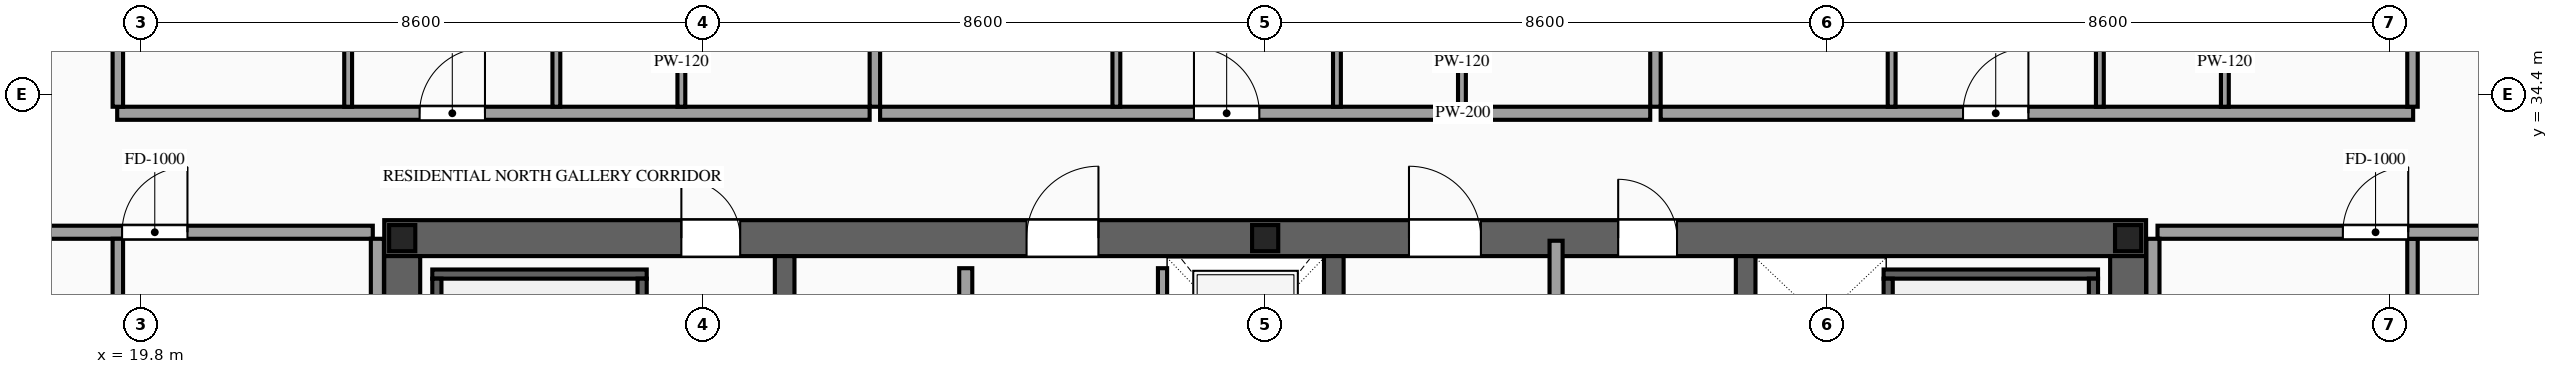
"""IFC4 building model, lengths in metres.
Left out: names, types, materials, properties, quantities, classifications, styles, units other than length and angle.
Written with IfcOpenShell. Run it as: python <this file> out.ifc"""

import sys

from ifc_helpers import new_model, si_unit, direction, frame, frame_2d, origin, origin_2d, place, context, subcontext, project, spatial, rectangle, i_section, extrude, source, transform, mapped, element, fill, save


model = new_model("IFC4")
c1 = context("Model", 3, precision=1e-05, world=origin(), true_north=direction((0.0, 1.0)))
c2 = subcontext(c1, "Body", "Model", "MODEL_VIEW")
j1 = project(units=[si_unit("LENGTHUNIT", "METRE"), si_unit("PLANEANGLEUNIT", "RADIAN")], contexts=[c1])
p1 = place(None, origin())
s1 = spatial("IfcSite", under=j1, at=p1, CompositionType="ELEMENT")
p2 = place(p1, origin())
s2 = spatial("IfcBuilding", under=s1, at=p2, CompositionType="ELEMENT")
p3 = place(p2, frame((0.0, 0.0, 255.6)))
s3 = spatial("IfcBuildingStorey", under=s2, at=p3, CompositionType="ELEMENT", Elevation=255.6)
p4 = place(p3, frame((23.525, 32.2, 0.0), z_axis=(0.0, 0.0, 1.0), x_axis=(1.0, 0.0, 0.0)))
e1 = element("IfcWall", 1, at=p4, inside=s3, PredefinedType="SHEAR", context=c2, shape_type="SweptSolid", body=[
    extrude(rectangle(XDim=26.95, YDim=0.55, at=frame_2d((13.475, 0.0))), origin(), (0.0, 0.0, 1.0), 3.5),
])
p5 = place(p4, frame((4.545, 0.0, 0.0)))
e2 = element("IfcOpeningElement", 2, at=p5, cuts=e1, PredefinedType="OPENING", context=c2, shape_type="SweptSolid", body=[
    extrude(rectangle(XDim=0.9, YDim=2.15, at=frame_2d((0.45, 1.075))), frame((0.0, 0.29, 0.0), z_axis=(0.0, -1.0, 0.0), x_axis=(1.0, 0.0, 0.0)), (0.0, 0.0, 1.0), 0.58),
])
p6 = place(p4, frame((9.825, 0.0, 0.0)))
e3 = element("IfcOpeningElement", 3, at=p6, cuts=e1, PredefinedType="OPENING", context=c2, shape_type="SweptSolid", body=[
    extrude(rectangle(XDim=1.1, YDim=2.2, at=frame_2d((0.55, 1.1))), frame((0.0, 0.29, 0.0), z_axis=(0.0, -1.0, 0.0), x_axis=(1.0, 0.0, 0.0)), (0.0, 0.0, 1.0), 0.58),
])
p7 = place(p4, frame((15.675, 0.0, 0.0)))
e4 = element("IfcOpeningElement", 4, at=p7, cuts=e1, PredefinedType="OPENING", context=c2, shape_type="SweptSolid", body=[
    extrude(rectangle(XDim=1.1, YDim=2.2, at=frame_2d((0.55, 1.1))), frame((0.0, 0.29, 0.0), z_axis=(0.0, -1.0, 0.0), x_axis=(1.0, 0.0, 0.0)), (0.0, 0.0, 1.0), 0.58),
])
p8 = place(p4, frame((18.875, 0.0, 0.0)))
e5 = element("IfcOpeningElement", 5, at=p8, cuts=e1, PredefinedType="OPENING", context=c2, shape_type="SweptSolid", body=[
    extrude(rectangle(XDim=0.9, YDim=2.15, at=frame_2d((0.45, 1.075))), frame((0.0, 0.29, 0.0), z_axis=(0.0, -1.0, 0.0), x_axis=(1.0, 0.0, 0.0)), (0.0, 0.0, 1.0), 0.58),
])
m1 = source(origin(), c2, "Body", "SweptSolid", [
    extrude(rectangle(XDim=12.25, YDim=0.55, at=frame_2d((6.125, 0.0))), origin(), (0.0, 0.0, 1.0), 3.5),
])
for number, where, z_axis, x_axis in (
    (6, (23.8, 19.675, 0.0), (0.0, 0.0, 1.0), (0.0, 1.0, 0.0)),
    (7, (50.2, 19.675, 0.0), (0.0, 0.0, 1.0), (0.0, 1.0, 0.0)),
):
    element("IfcWall", number, at=place(p3, frame(where, z_axis=z_axis, x_axis=x_axis)), inside=s3, PredefinedType="SHEAR", context=c2, shape_type="MappedRepresentation", body=[
        mapped(m1, transform((0.0, 0.0, 0.0), scale=1.0)),
    ])
m2 = source(origin(), c2, "Body", "SweptSolid", [
    extrude(rectangle(XDim=12.25, YDim=0.3, at=frame_2d((6.125, 0.0))), origin(), (0.0, 0.0, 1.0), 3.5),
])
for number, where, z_axis, x_axis in (
    (8, (29.65, 19.675, 0.0), (0.0, 0.0, 1.0), (0.0, 1.0, 0.0)),
    (9, (38.05, 19.675, 0.0), (0.0, 0.0, 1.0), (0.0, 1.0, 0.0)),
    (10, (44.35, 19.675, 0.0), (0.0, 0.0, 1.0), (0.0, 1.0, 0.0)),
):
    element("IfcWall", number, at=place(p3, frame(where, z_axis=z_axis, x_axis=x_axis)), inside=s3, PredefinedType="SOLIDWALL", context=c2, shape_type="MappedRepresentation", body=[
        mapped(m2, transform((0.0, 0.0, 0.0), scale=1.0)),
    ])
m3 = source(origin(), c2, "Body", "SweptSolid", [
    extrude(i_section(OverallWidth=0.4, OverallDepth=0.4, WebThickness=0.013, FlangeThickness=0.021, at=origin_2d()), origin(), (0.0, 0.0, 1.0), 3.5),
])
for number, where, z_axis, x_axis in (
    (11, (23.8, 32.2, 0.0), (0.0, 0.0, 1.0), (1.0, 0.0, 0.0)),
    (12, (37.0, 32.2, 0.0), (0.0, 0.0, 1.0), (1.0, 0.0, 0.0)),
    (13, (50.2, 32.2, 0.0), (0.0, 0.0, 1.0), (1.0, 0.0, 0.0)),
):
    element("IfcColumn", number, at=place(p3, frame(where, z_axis=z_axis, x_axis=x_axis)), inside=s3, PredefinedType="COLUMN", context=c2, shape_type="MappedRepresentation", body=[
        mapped(m3, transform((0.0, 0.0, 0.0), scale=1.0)),
    ])
p9 = place(p3, frame((35.43, 29.4, 0.0), z_axis=(0.0, 0.0, 1.0), x_axis=(0.0, 1.0, 0.0)))
e14 = element("IfcWall", 14, at=p9, inside=s3, PredefinedType="SOLIDWALL", context=c2, shape_type="SweptSolid", body=[
    extrude(rectangle(XDim=2.34, YDim=0.14, at=frame_2d((1.17, 0.0))), origin(), (0.0, 0.0, 1.0), 3.2),
])
p10 = place(p9, frame((0.62, 0.0, 0.0)))
e15 = element("IfcOpeningElement", 15, at=p10, cuts=e14, PredefinedType="OPENING", context=c2, shape_type="SweptSolid", body=[
    extrude(rectangle(XDim=1.1, YDim=2.2, at=frame_2d((0.55, 1.1))), frame((0.0, 0.085, 0.0), z_axis=(0.0, -1.0, 0.0), x_axis=(1.0, 0.0, 0.0)), (0.0, 0.0, 1.0), 0.17),
])
m4 = source(origin(), c2, "Body", "SweptSolid", [
    extrude(rectangle(XDim=3.28, YDim=0.14, at=frame_2d((1.64, 0.0))), origin(), (0.0, 0.0, 1.0), 3.2),
])
p11 = place(p3, frame((24.26, 31.65, 0.0), z_axis=(0.0, 0.0, 1.0), x_axis=(1.0, 0.0, 0.0)))
e16 = element("IfcWall", 16, at=p11, inside=s3, PredefinedType="SOLIDWALL", context=c2, shape_type="MappedRepresentation", body=[
    mapped(m4, transform((0.0, 0.0, 0.0), scale=1.0)),
])
m5 = source(origin(), c2, "Body", "SweptSolid", [
    extrude(rectangle(XDim=8.94, YDim=0.14, at=frame_2d((4.47, 0.0))), origin(), (0.0, 0.0, 1.0), 3.2),
])
for number, where, z_axis, x_axis in (
    (17, (24.33, 22.64, 0.0), (0.0, 0.0, 1.0), (0.0, 1.0, 0.0)),
    (18, (27.47, 22.64, 0.0), (0.0, 0.0, 1.0), (0.0, 1.0, 0.0)),
):
    element("IfcWall", number, at=place(p3, frame(where, z_axis=z_axis, x_axis=x_axis)), inside=s3, PredefinedType="SOLIDWALL", context=c2, shape_type="MappedRepresentation", body=[
        mapped(m5, transform((0.0, 0.0, 0.0), scale=1.0)),
    ])
p12 = place(p3, frame((46.46, 31.65, 0.0), z_axis=(0.0, 0.0, 1.0), x_axis=(1.0, 0.0, 0.0)))
e19 = element("IfcWall", 19, at=p12, inside=s3, PredefinedType="SOLIDWALL", context=c2, shape_type="MappedRepresentation", body=[
    mapped(m4, transform((0.0, 0.0, 0.0), scale=1.0)),
])
for number, where, z_axis, x_axis in (
    (20, (46.53, 22.64, 0.0), (0.0, 0.0, 1.0), (0.0, 1.0, 0.0)),
    (21, (49.67, 22.64, 0.0), (0.0, 0.0, 1.0), (0.0, 1.0, 0.0)),
):
    element("IfcWall", number, at=place(p3, frame(where, z_axis=z_axis, x_axis=x_axis)), inside=s3, PredefinedType="SOLIDWALL", context=c2, shape_type="MappedRepresentation", body=[
        mapped(m5, transform((0.0, 0.0, 0.0), scale=1.0)),
    ])
p13 = place(p3, frame((32.42, 24.05, 0.0), z_axis=(0.0, 0.0, 1.0), x_axis=(0.0, 1.0, 0.0)))
e22 = element("IfcWall", 22, at=p13, inside=s3, PredefinedType="PARTITIONING", context=c2, shape_type="SweptSolid", body=[
    extrude(rectangle(XDim=7.69, YDim=0.2, at=frame_2d((3.845, 0.0))), origin(), (0.0, 0.0, 1.0), 3.2),
])
p14 = place(p13, frame((3.395, 0.0, 0.0)))
e23 = element("IfcOpeningElement", 23, at=p14, cuts=e22, PredefinedType="OPENING", context=c2, shape_type="SweptSolid", body=[
    extrude(rectangle(XDim=0.9, YDim=2.15, at=frame_2d((0.45, 1.075))), frame((0.0, 0.115, 0.0), z_axis=(0.0, -1.0, 0.0), x_axis=(1.0, 0.0, 0.0)), (0.0, 0.0, 1.0), 0.23),
])
m6 = source(origin(), c2, "Body", "SweptSolid", [
    extrude(rectangle(XDim=5.96, YDim=0.2, at=frame_2d((2.98, 0.0))), origin(), (0.0, 0.0, 1.0), 3.2),
])
p15 = place(p3, frame((41.45, 26.2, 0.0), z_axis=(0.0, 0.0, 1.0), x_axis=(0.0, 1.0, 0.0)))
e24 = element("IfcWall", 24, at=p15, inside=s3, PredefinedType="PARTITIONING", context=c2, shape_type="MappedRepresentation", body=[
    mapped(m6, transform((0.0, 0.0, 0.0), scale=1.0)),
])
p16 = place(p3, frame((19.44, 34.11, 0.0), z_axis=(0.0, 0.0, 1.0), x_axis=(1.0, 0.0, 0.0)))
e25 = element("IfcWall", 25, at=p16, inside=s3, PredefinedType="PARTITIONING", context=c2, shape_type="SweptSolid", body=[
    extrude(rectangle(XDim=11.51, YDim=0.2, at=frame_2d((5.755, 0.0))), origin(), (0.0, 0.0, 1.0), 3.2),
])
p17 = place(p16, frame((4.626, 0.0, 0.0)))
e26 = element("IfcOpeningElement", 26, at=p17, cuts=e25, PredefinedType="OPENING", context=c2, shape_type="SweptSolid", body=[
    extrude(rectangle(XDim=1.0, YDim=2.2, at=frame_2d((0.5, 1.1))), frame((0.0, 0.115, 0.0), z_axis=(0.0, -1.0, 0.0), x_axis=(1.0, 0.0, 0.0)), (0.0, 0.0, 1.0), 0.23),
])
m7 = source(origin(), c2, "Body", "SweptSolid", [
    extrude(rectangle(XDim=12.04, YDim=0.16, at=frame_2d((6.02, 0.0))), origin(), (0.0, 0.0, 1.0), 3.2),
])
p18 = place(p3, frame((31.03, 34.21, 0.0), z_axis=(0.0, 0.0, 1.0), x_axis=(0.0, 1.0, 0.0)))
e27 = element("IfcWall", 27, at=p18, inside=s3, PredefinedType="PARTITIONING", context=c2, shape_type="MappedRepresentation", body=[
    mapped(m7, transform((0.0, 0.0, 0.0), scale=1.0)),
])
m8 = source(origin(), c2, "Body", "SweptSolid", [
    extrude(rectangle(XDim=4.11, YDim=0.12, at=frame_2d((2.055, 0.0))), origin(), (0.0, 0.0, 1.0), 3.2),
])
p19 = place(p3, frame((22.973, 34.21, 0.0), z_axis=(0.0, 0.0, 1.0), x_axis=(0.0, 1.0, 0.0)))
e28 = element("IfcWall", 28, at=p19, inside=s3, PredefinedType="PARTITIONING", context=c2, shape_type="MappedRepresentation", body=[
    mapped(m8, transform((0.0, 0.0, 0.0), scale=1.0)),
])
p20 = place(p3, frame((28.07, 34.21, 0.0), z_axis=(0.0, 0.0, 1.0), x_axis=(0.0, 1.0, 0.0)))
e29 = element("IfcWall", 29, at=p20, inside=s3, PredefinedType="PARTITIONING", context=c2, shape_type="SweptSolid", body=[
    extrude(rectangle(XDim=4.11, YDim=0.12, at=frame_2d((2.055, 0.0))), origin(), (0.0, 0.0, 1.0), 3.2),
])
p21 = place(p20, frame((1.63, 0.0, 0.0)))
e30 = element("IfcOpeningElement", 30, at=p21, cuts=e29, PredefinedType="OPENING", context=c2, shape_type="SweptSolid", body=[
    extrude(rectangle(XDim=0.85, YDim=2.1, at=frame_2d((0.425, 1.05))), frame((0.0, 0.075, 0.0), z_axis=(0.0, -1.0, 0.0), x_axis=(1.0, 0.0, 0.0)), (0.0, 0.0, 1.0), 0.15),
])
p22 = place(p3, frame((26.158, 34.21, 0.0), z_axis=(0.0, 0.0, 1.0), x_axis=(0.0, 1.0, 0.0)))
e31 = element("IfcWall", 31, at=p22, inside=s3, PredefinedType="PARTITIONING", context=c2, shape_type="SweptSolid", body=[
    extrude(rectangle(XDim=4.11, YDim=0.12, at=frame_2d((2.055, 0.0))), origin(), (0.0, 0.0, 1.0), 3.2),
])
p23 = place(p22, frame((1.63, 0.0, 0.0)))
e32 = element("IfcOpeningElement", 32, at=p23, cuts=e31, PredefinedType="OPENING", context=c2, shape_type="SweptSolid", body=[
    extrude(rectangle(XDim=0.85, YDim=2.1, at=frame_2d((0.425, 1.05))), frame((0.0, 0.075, 0.0), z_axis=(0.0, -1.0, 0.0), x_axis=(1.0, 0.0, 0.0)), (0.0, 0.0, 1.0), 0.15),
])
p24 = place(p3, frame((31.11, 34.11, 0.0), z_axis=(0.0, 0.0, 1.0), x_axis=(1.0, 0.0, 0.0)))
e33 = element("IfcWall", 33, at=p24, inside=s3, PredefinedType="PARTITIONING", context=c2, shape_type="SweptSolid", body=[
    extrude(rectangle(XDim=11.78, YDim=0.2, at=frame_2d((5.89, 0.0))), origin(), (0.0, 0.0, 1.0), 3.2),
])
p25 = place(p24, frame((4.801, 0.0, 0.0)))
e34 = element("IfcOpeningElement", 34, at=p25, cuts=e33, PredefinedType="OPENING", context=c2, shape_type="SweptSolid", body=[
    extrude(rectangle(XDim=1.0, YDim=2.2, at=frame_2d((0.5, 1.1))), frame((0.0, 0.115, 0.0), z_axis=(0.0, -1.0, 0.0), x_axis=(1.0, 0.0, 0.0)), (0.0, 0.0, 1.0), 0.23),
])
p26 = place(p3, frame((42.97, 34.21, 0.0), z_axis=(0.0, 0.0, 1.0), x_axis=(0.0, 1.0, 0.0)))
e35 = element("IfcWall", 35, at=p26, inside=s3, PredefinedType="PARTITIONING", context=c2, shape_type="MappedRepresentation", body=[
    mapped(m7, transform((0.0, 0.0, 0.0), scale=1.0)),
])
p27 = place(p3, frame((34.724, 34.21, 0.0), z_axis=(0.0, 0.0, 1.0), x_axis=(0.0, 1.0, 0.0)))
e36 = element("IfcWall", 36, at=p27, inside=s3, PredefinedType="PARTITIONING", context=c2, shape_type="MappedRepresentation", body=[
    mapped(m8, transform((0.0, 0.0, 0.0), scale=1.0)),
])
p28 = place(p3, frame((40.01, 34.21, 0.0), z_axis=(0.0, 0.0, 1.0), x_axis=(0.0, 1.0, 0.0)))
e37 = element("IfcWall", 37, at=p28, inside=s3, PredefinedType="PARTITIONING", context=c2, shape_type="SweptSolid", body=[
    extrude(rectangle(XDim=4.11, YDim=0.12, at=frame_2d((2.055, 0.0))), origin(), (0.0, 0.0, 1.0), 3.2),
])
p29 = place(p28, frame((1.63, 0.0, 0.0)))
e38 = element("IfcOpeningElement", 38, at=p29, cuts=e37, PredefinedType="OPENING", context=c2, shape_type="SweptSolid", body=[
    extrude(rectangle(XDim=0.85, YDim=2.1, at=frame_2d((0.425, 1.05))), frame((0.0, 0.075, 0.0), z_axis=(0.0, -1.0, 0.0), x_axis=(1.0, 0.0, 0.0)), (0.0, 0.0, 1.0), 0.15),
])
p30 = place(p3, frame((38.098, 34.21, 0.0), z_axis=(0.0, 0.0, 1.0), x_axis=(0.0, 1.0, 0.0)))
e39 = element("IfcWall", 39, at=p30, inside=s3, PredefinedType="PARTITIONING", context=c2, shape_type="SweptSolid", body=[
    extrude(rectangle(XDim=4.11, YDim=0.12, at=frame_2d((2.055, 0.0))), origin(), (0.0, 0.0, 1.0), 3.2),
])
p31 = place(p30, frame((1.63, 0.0, 0.0)))
e40 = element("IfcOpeningElement", 40, at=p31, cuts=e39, PredefinedType="OPENING", context=c2, shape_type="SweptSolid", body=[
    extrude(rectangle(XDim=0.85, YDim=2.1, at=frame_2d((0.425, 1.05))), frame((0.0, 0.075, 0.0), z_axis=(0.0, -1.0, 0.0), x_axis=(1.0, 0.0, 0.0)), (0.0, 0.0, 1.0), 0.15),
])
p32 = place(p3, frame((43.05, 34.11, 0.0), z_axis=(0.0, 0.0, 1.0), x_axis=(1.0, 0.0, 0.0)))
e41 = element("IfcWall", 41, at=p32, inside=s3, PredefinedType="PARTITIONING", context=c2, shape_type="SweptSolid", body=[
    extrude(rectangle(XDim=11.51, YDim=0.2, at=frame_2d((5.755, 0.0))), origin(), (0.0, 0.0, 1.0), 3.2),
])
p33 = place(p32, frame((4.625, 0.0, 0.0)))
e42 = element("IfcOpeningElement", 42, at=p33, cuts=e41, PredefinedType="OPENING", context=c2, shape_type="SweptSolid", body=[
    extrude(rectangle(XDim=1.0, YDim=2.2, at=frame_2d((0.5, 1.1))), frame((0.0, 0.115, 0.0), z_axis=(0.0, -1.0, 0.0), x_axis=(1.0, 0.0, 0.0)), (0.0, 0.0, 1.0), 0.23),
])
m9 = source(origin(), c2, "Body", "SweptSolid", [
    extrude(rectangle(XDim=11.89, YDim=0.16, at=frame_2d((5.945, 0.0))), origin(), (0.0, 0.0, 1.0), 3.2),
])
for number, where, z_axis, x_axis in (
    (43, (19.45, 34.21, 0.0), (0.0, 0.0, 1.0), (0.0, 1.0, 0.0)),
    (44, (54.55, 34.21, 0.0), (0.0, 0.0, 1.0), (0.0, 1.0, 0.0)),
):
    element("IfcWall", number, at=place(p3, frame(where, z_axis=z_axis, x_axis=x_axis)), inside=s3, PredefinedType="PARTITIONING", context=c2, shape_type="MappedRepresentation", body=[
        mapped(m9, transform((0.0, 0.0, 0.0), scale=1.0)),
    ])
p34 = place(p3, frame((46.583, 34.21, 0.0), z_axis=(0.0, 0.0, 1.0), x_axis=(0.0, 1.0, 0.0)))
e45 = element("IfcWall", 45, at=p34, inside=s3, PredefinedType="PARTITIONING", context=c2, shape_type="MappedRepresentation", body=[
    mapped(m8, transform((0.0, 0.0, 0.0), scale=1.0)),
])
p35 = place(p3, frame((51.68, 34.21, 0.0), z_axis=(0.0, 0.0, 1.0), x_axis=(0.0, 1.0, 0.0)))
e46 = element("IfcWall", 46, at=p35, inside=s3, PredefinedType="PARTITIONING", context=c2, shape_type="SweptSolid", body=[
    extrude(rectangle(XDim=4.11, YDim=0.12, at=frame_2d((2.055, 0.0))), origin(), (0.0, 0.0, 1.0), 3.2),
])
p36 = place(p35, frame((1.63, 0.0, 0.0)))
e47 = element("IfcOpeningElement", 47, at=p36, cuts=e46, PredefinedType="OPENING", context=c2, shape_type="SweptSolid", body=[
    extrude(rectangle(XDim=0.85, YDim=2.1, at=frame_2d((0.425, 1.05))), frame((0.0, 0.075, 0.0), z_axis=(0.0, -1.0, 0.0), x_axis=(1.0, 0.0, 0.0)), (0.0, 0.0, 1.0), 0.15),
])
p37 = place(p3, frame((49.768, 34.21, 0.0), z_axis=(0.0, 0.0, 1.0), x_axis=(0.0, 1.0, 0.0)))
e48 = element("IfcWall", 48, at=p37, inside=s3, PredefinedType="PARTITIONING", context=c2, shape_type="SweptSolid", body=[
    extrude(rectangle(XDim=4.11, YDim=0.12, at=frame_2d((2.055, 0.0))), origin(), (0.0, 0.0, 1.0), 3.2),
])
p38 = place(p37, frame((1.63, 0.0, 0.0)))
e49 = element("IfcOpeningElement", 49, at=p38, cuts=e48, PredefinedType="OPENING", context=c2, shape_type="SweptSolid", body=[
    extrude(rectangle(XDim=0.85, YDim=2.1, at=frame_2d((0.425, 1.05))), frame((0.0, 0.075, 0.0), z_axis=(0.0, -1.0, 0.0), x_axis=(1.0, 0.0, 0.0)), (0.0, 0.0, 1.0), 0.15),
])
p39 = place(p3, frame((16.55, 32.29, 0.0), z_axis=(0.0, 0.0, 1.0), x_axis=(1.0, 0.0, 0.0)))
e50 = element("IfcWall", 50, at=p39, inside=s3, PredefinedType="PARTITIONING", context=c2, shape_type="SweptSolid", body=[
    extrude(rectangle(XDim=6.8, YDim=0.2, at=frame_2d((3.4, 0.0))), origin(), (0.0, 0.0, 1.0), 2.745),
])
p40 = place(p39, frame((2.965, 0.0, 0.0)))
e51 = element("IfcOpeningElement", 51, at=p40, cuts=e50, PredefinedType="OPENING", context=c2, shape_type="SweptSolid", body=[
    extrude(rectangle(XDim=1.0, YDim=2.2, at=frame_2d((0.5, 1.1))), frame((0.0, 0.115, 0.0), z_axis=(0.0, -1.0, 0.0), x_axis=(1.0, 0.0, 0.0)), (0.0, 0.0, 1.0), 0.23),
])
m10 = source(origin(), c2, "Body", "SweptSolid", [
    extrude(rectangle(XDim=26.69, YDim=0.16, at=frame_2d((13.345, 0.0))), origin(), (0.0, 0.0, 1.0), 3.2),
])
for number, where, z_axis, x_axis in (
    (52, (19.45, 5.5, 0.0), (0.0, 0.0, 1.0), (0.0, 1.0, 0.0)),
    (53, (54.55, 5.5, 0.0), (0.0, 0.0, 1.0), (0.0, 1.0, 0.0)),
):
    element("IfcWall", number, at=place(p3, frame(where, z_axis=z_axis, x_axis=x_axis)), inside=s3, PredefinedType="PARTITIONING", context=c2, shape_type="MappedRepresentation", body=[
        mapped(m10, transform((0.0, 0.0, 0.0), scale=1.0)),
    ])
m11 = source(origin(), c2, "Body", "SweptSolid", [
    extrude(rectangle(XDim=6.29, YDim=0.2, at=frame_2d((3.145, 0.0))), origin(), (0.0, 0.0, 1.0), 3.2),
])
p41 = place(p3, frame((23.42, 25.9, 0.0), z_axis=(0.0, 0.0, 1.0), x_axis=(0.0, 1.0, 0.0)))
e54 = element("IfcWall", 54, at=p41, inside=s3, PredefinedType="PARTITIONING", context=c2, shape_type="MappedRepresentation", body=[
    mapped(m11, transform((0.0, 0.0, 0.0), scale=1.0)),
])
p42 = place(p3, frame((50.65, 32.29, 0.0), z_axis=(0.0, 0.0, 1.0), x_axis=(1.0, 0.0, 0.0)))
e55 = element("IfcWall", 55, at=p42, inside=s3, PredefinedType="PARTITIONING", context=c2, shape_type="SweptSolid", body=[
    extrude(rectangle(XDim=6.8, YDim=0.2, at=frame_2d((3.4, 0.0))), origin(), (0.0, 0.0, 1.0), 2.745),
])
p43 = place(p42, frame((2.835, 0.0, 0.0)))
e56 = element("IfcOpeningElement", 56, at=p43, cuts=e55, PredefinedType="OPENING", context=c2, shape_type="SweptSolid", body=[
    extrude(rectangle(XDim=1.0, YDim=2.2, at=frame_2d((0.5, 1.1))), frame((0.0, 0.115, 0.0), z_axis=(0.0, -1.0, 0.0), x_axis=(1.0, 0.0, 0.0)), (0.0, 0.0, 1.0), 0.23),
])
p44 = place(p3, frame((50.58, 25.9, 0.0), z_axis=(0.0, 0.0, 1.0), x_axis=(0.0, 1.0, 0.0)))
e57 = element("IfcWall", 57, at=p44, inside=s3, PredefinedType="PARTITIONING", context=c2, shape_type="MappedRepresentation", body=[
    mapped(m11, transform((0.0, 0.0, 0.0), scale=1.0)),
])
m12 = source(origin(), c2, "Body", "SweptSolid", [
    extrude(rectangle(XDim=0.9, YDim=2.15, at=frame_2d((0.45, 1.075))), frame((0.0, 0.025, 0.0), z_axis=(0.0, -1.0, 0.0), x_axis=(1.0, 0.0, 0.0)), (0.0, 0.0, 1.0), 0.05),
])
p45 = place(p5, origin())
e58 = element("IfcDoor", 58, at=p45, inside=s3, OperationType="SINGLE_SWING_LEFT", PredefinedType="DOOR", context=c2, shape_type="MappedRepresentation", body=[
    mapped(m12, transform((0.0, 0.0, 0.0), scale=1.0)),
])
fill(e2, e58)
m13 = source(origin(), c2, "Body", "SweptSolid", [
    extrude(rectangle(XDim=1.1, YDim=2.2, at=frame_2d((0.55, 1.1))), frame((0.0, 0.025, 0.0), z_axis=(0.0, -1.0, 0.0), x_axis=(1.0, 0.0, 0.0)), (0.0, 0.0, 1.0), 0.05),
])
p46 = place(p6, origin())
e59 = element("IfcDoor", 59, at=p46, inside=s3, OperationType="SINGLE_SWING_RIGHT", PredefinedType="DOOR", context=c2, shape_type="MappedRepresentation", body=[
    mapped(m13, transform((0.0, 0.0, 0.0), scale=1.0)),
])
fill(e3, e59)
p47 = place(p7, origin())
e60 = element("IfcDoor", 60, at=p47, inside=s3, OperationType="SINGLE_SWING_LEFT", PredefinedType="DOOR", context=c2, shape_type="MappedRepresentation", body=[
    mapped(m13, transform((0.0, 0.0, 0.0), scale=1.0)),
])
fill(e4, e60)
p48 = place(p8, origin())
e61 = element("IfcDoor", 61, at=p48, inside=s3, OperationType="SINGLE_SWING_LEFT", PredefinedType="DOOR", context=c2, shape_type="MappedRepresentation", body=[
    mapped(m12, transform((0.0, 0.0, 0.0), scale=1.0)),
])
fill(e5, e61)
m14 = source(origin(), c2, "Body", "SweptSolid", [
    extrude(rectangle(XDim=1.0, YDim=2.2, at=frame_2d((0.5, 1.1))), frame((0.0, 0.025, 0.0), z_axis=(0.0, -1.0, 0.0), x_axis=(1.0, 0.0, 0.0)), (0.0, 0.0, 1.0), 0.05),
])
p49 = place(p17, origin())
e62 = element("IfcDoor", 62, at=p49, inside=s3, OperationType="SINGLE_SWING_RIGHT", PredefinedType="DOOR", context=c2, shape_type="MappedRepresentation", body=[
    mapped(m14, transform((0.0, 0.0, 0.0), scale=1.0)),
])
fill(e26, e62)
p50 = place(p25, origin())
e63 = element("IfcDoor", 63, at=p50, inside=s3, OperationType="SINGLE_SWING_LEFT", PredefinedType="DOOR", context=c2, shape_type="MappedRepresentation", body=[
    mapped(m14, transform((0.0, 0.0, 0.0), scale=1.0)),
])
fill(e34, e63)
p51 = place(p33, origin())
e64 = element("IfcDoor", 64, at=p51, inside=s3, OperationType="SINGLE_SWING_RIGHT", PredefinedType="DOOR", context=c2, shape_type="MappedRepresentation", body=[
    mapped(m14, transform((0.0, 0.0, 0.0), scale=1.0)),
])
fill(e42, e64)
p52 = place(p40, origin())
e65 = element("IfcDoor", 65, at=p52, inside=s3, OperationType="SINGLE_SWING_RIGHT", PredefinedType="DOOR", context=c2, shape_type="MappedRepresentation", body=[
    mapped(m14, transform((0.0, 0.0, 0.0), scale=1.0)),
])
fill(e51, e65)
p53 = place(p43, origin())
e66 = element("IfcDoor", 66, at=p53, inside=s3, OperationType="SINGLE_SWING_RIGHT", PredefinedType="DOOR", context=c2, shape_type="MappedRepresentation", body=[
    mapped(m14, transform((0.0, 0.0, 0.0), scale=1.0)),
])
fill(e56, e66)
save(model, sys.argv[1])
